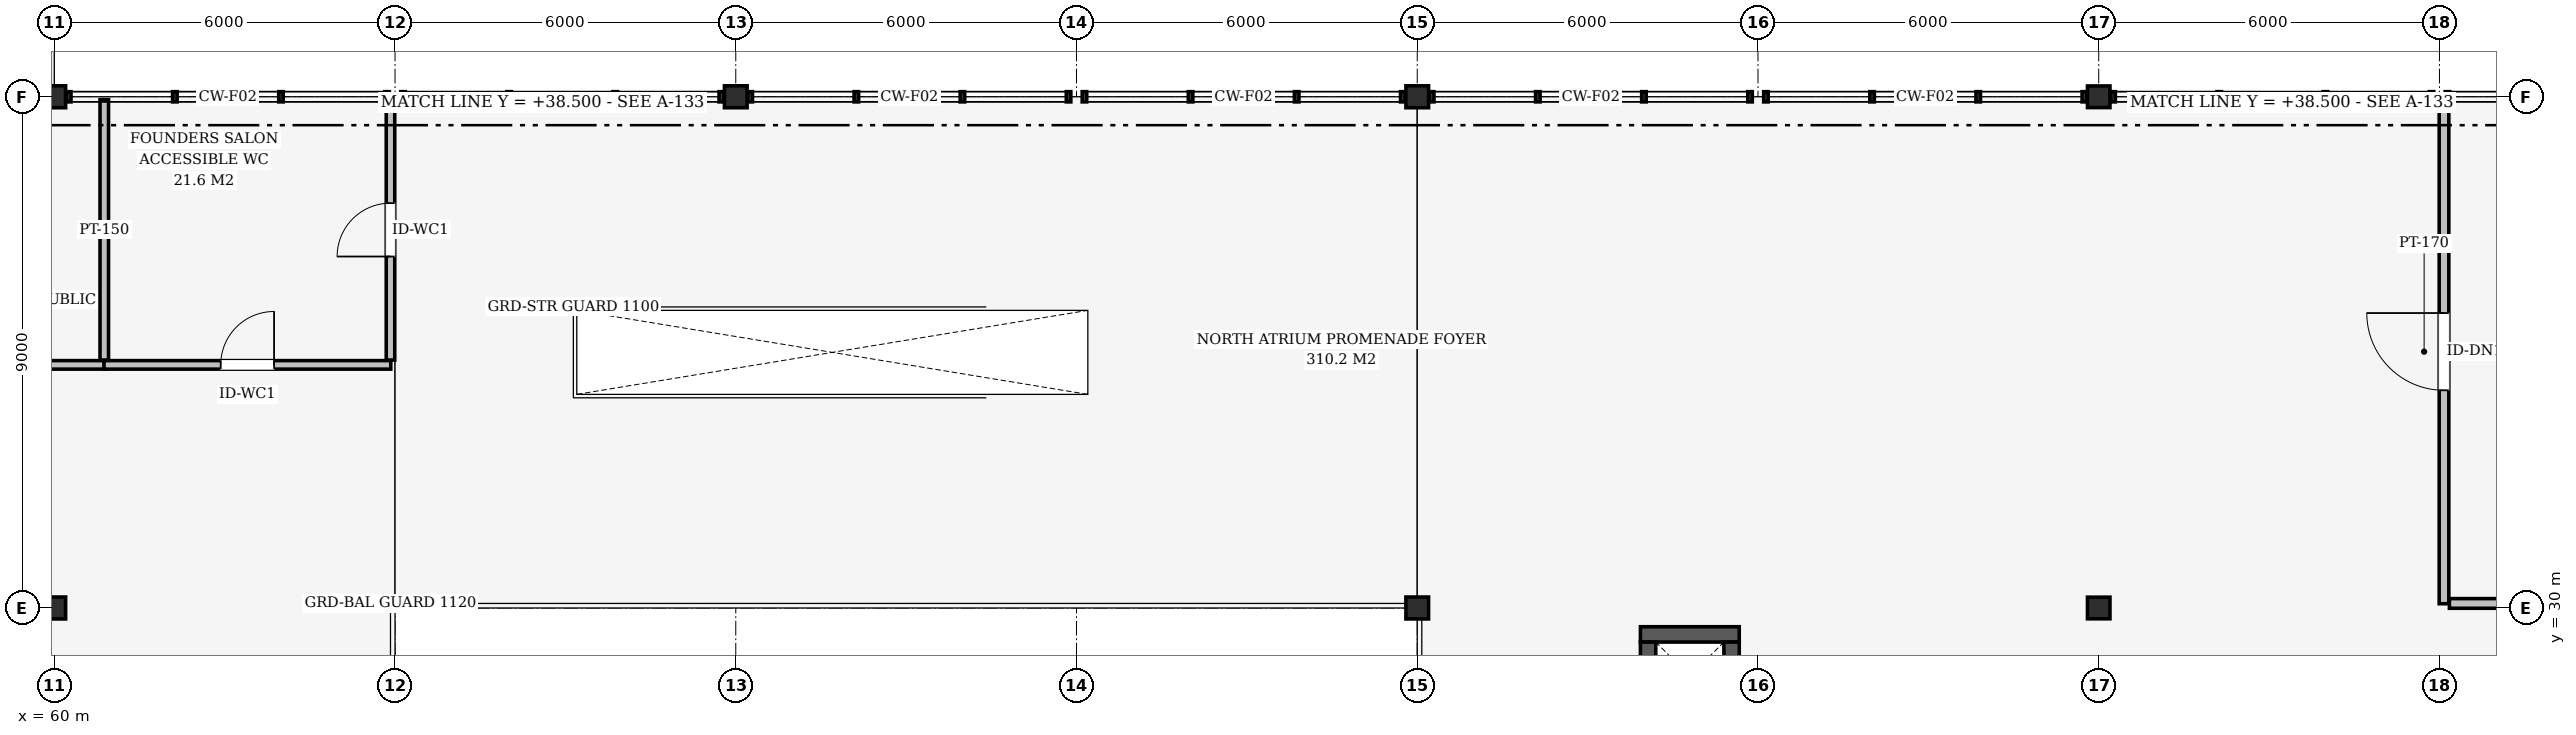
"""IFC4 building model, lengths in metres.
Left out: names, types, materials, properties, quantities, classifications, styles, units other than length and angle.
Written with IfcOpenShell. Run it as: python <this file> out.ifc"""

import sys

from ifc_helpers import new_model, si_unit, direction, frame, frame_2d, origin, origin_2d, place, context, subcontext, project, spatial, rectangle, i_section, extrude, element, fill, save


model = new_model("IFC4")
c1 = context("Model", 3, precision=1e-05, world=origin(), true_north=direction((0.0, 1.0)))
c2 = subcontext(c1, "Body", "Model", "MODEL_VIEW")
j1 = project(units=[si_unit("LENGTHUNIT", "METRE"), si_unit("PLANEANGLEUNIT", "RADIAN")], contexts=[c1])
p1 = place(None, origin())
s1 = spatial("IfcSite", under=j1, at=p1, CompositionType="ELEMENT")
p2 = place(p1, origin())
s2 = spatial("IfcBuilding", under=s1, at=p2, CompositionType="ELEMENT")
p3 = place(p2, frame((0.0, 0.0, 9.3)))
s3 = spatial("IfcBuildingStorey", under=s2, at=p3, CompositionType="ELEMENT", Elevation=9.3)
for number, where, z_axis, x_axis in (
    (1, (60.0, 30.0, 0.0), (0.0, 0.0, 1.0), (1.0, 0.0, 0.0)),
    (2, (60.0, 39.0, 0.0), (0.0, 0.0, 1.0), (1.0, 0.0, 0.0)),
    (3, (72.0, 39.0, 0.0), (0.0, 0.0, 1.0), (1.0, 0.0, 0.0)),
    (4, (84.0, 30.0, 0.0), (0.0, 0.0, 1.0), (1.0, 0.0, 0.0)),
    (5, (84.0, 39.0, 0.0), (0.0, 0.0, 1.0), (1.0, 0.0, 0.0)),
):
    element("IfcColumn", number, at=place(p3, frame(where, z_axis=z_axis, x_axis=x_axis)), inside=s3, PredefinedType="COLUMN", context=c2, shape_type="SweptSolid", body=[
        extrude(i_section(OverallWidth=0.399, OverallDepth=0.386, WebThickness=0.021, FlangeThickness=0.033, at=origin_2d()), origin(), (0.0, 0.0, 1.0), 4.37),
    ])
for number, where, z_axis, x_axis in (
    (6, (96.0, 30.0, 0.0), (0.0, 0.0, 1.0), (1.0, 0.0, 0.0)),
    (7, (96.0, 39.0, 0.0), (0.0, 0.0, 1.0), (1.0, 0.0, 0.0)),
):
    element("IfcColumn", number, at=place(p3, frame(where, z_axis=z_axis, x_axis=x_axis)), inside=s3, PredefinedType="COLUMN", context=c2, shape_type="SweptSolid", body=[
        extrude(i_section(OverallWidth=0.396, OverallDepth=0.381, WebThickness=0.019, FlangeThickness=0.03, at=origin_2d()), origin(), (0.0, 0.0, 1.0), 4.37),
    ])
p4 = place(p3, frame((87.93, 29.535, 0.0), z_axis=(0.0, 0.0, 1.0), x_axis=(1.0, 0.0, 0.0)))
e8 = element("IfcWall", 8, at=p4, inside=s3, PredefinedType="SHEAR", context=c2, shape_type="SweptSolid", body=[
    extrude(rectangle(XDim=1.74, YDim=0.27, at=frame_2d((0.87, 0.0))), origin(), (0.0, 0.0, 1.0), 4.37),
])
for number, where, z_axis, x_axis in (
    (9, (88.065, 28.2, 0.0), (0.0, 0.0, 1.0), (0.0, 1.0, 0.0)),
    (10, (89.535, 28.2, 0.0), (0.0, 0.0, 1.0), (0.0, 1.0, 0.0)),
):
    element("IfcWall", number, at=place(p3, frame(where, z_axis=z_axis, x_axis=x_axis)), inside=s3, PredefinedType="SHEAR", context=c2, shape_type="SweptSolid", body=[
        extrude(rectangle(XDim=1.2, YDim=0.27, at=frame_2d((0.6, 0.0))), origin(), (0.0, 0.0, 1.0), 4.37),
    ])
p5 = place(p3, frame((48.09, 34.28, 0.0), z_axis=(0.0, 0.0, 1.0), x_axis=(1.0, 0.0, 0.0)))
e11 = element("IfcWall", 11, at=p5, inside=s3, PredefinedType="PARTITIONING", context=c2, shape_type="SweptSolid", body=[
    extrude(rectangle(XDim=12.795, YDim=0.15, at=frame_2d((6.397, 0.0))), origin(), (0.0, 0.0, 1.0), 4.35),
])
p6 = place(p5, frame((5.893, 0.0, 0.0)))
e12 = element("IfcOpeningElement", 12, at=p6, cuts=e11, PredefinedType="OPENING", context=c2, shape_type="SweptSolid", body=[
    extrude(rectangle(XDim=1.01, YDim=2.1, at=frame_2d((0.505, 1.05))), frame((0.0, 0.085, 0.0), z_axis=(0.0, -1.0, 0.0), x_axis=(1.0, 0.0, 0.0)), (0.0, 0.0, 1.0), 0.17),
])
p7 = place(p3, frame((60.875, 34.28, 0.0), z_axis=(0.0, 0.0, 1.0), x_axis=(1.0, 0.0, 0.0)))
e13 = element("IfcWall", 13, at=p7, inside=s3, PredefinedType="PARTITIONING", context=c2, shape_type="SweptSolid", body=[
    extrude(rectangle(XDim=5.05, YDim=0.15, at=frame_2d((2.525, 0.0))), origin(), (0.0, 0.0, 1.0), 4.35),
])
p8 = place(p7, frame((2.055, 0.0, 0.0)))
e14 = element("IfcOpeningElement", 14, at=p8, cuts=e13, PredefinedType="OPENING", context=c2, shape_type="SweptSolid", body=[
    extrude(rectangle(XDim=0.94, YDim=2.1, at=frame_2d((0.47, 1.05))), frame((0.0, 0.085, 0.0), z_axis=(0.0, -1.0, 0.0), x_axis=(1.0, 0.0, 0.0)), (0.0, 0.0, 1.0), 0.17),
])
p9 = place(p3, frame((60.88, 34.365, 0.0), z_axis=(0.0, 0.0, 1.0), x_axis=(0.0, 1.0, 0.0)))
e15 = element("IfcWall", 15, at=p9, inside=s3, PredefinedType="PARTITIONING", context=c2, shape_type="SweptSolid", body=[
    extrude(rectangle(XDim=4.585, YDim=0.15, at=frame_2d((2.292, 0.0))), origin(), (0.0, 0.0, 1.0), 4.35),
])
p10 = place(p3, frame((65.92, 34.365, 0.0), z_axis=(0.0, 0.0, 1.0), x_axis=(0.0, 1.0, 0.0)))
e16 = element("IfcWall", 16, at=p10, inside=s3, PredefinedType="PARTITIONING", context=c2, shape_type="SweptSolid", body=[
    extrude(rectangle(XDim=4.585, YDim=0.15, at=frame_2d((2.292, 0.0))), origin(), (0.0, 0.0, 1.0), 3.936),
])
p11 = place(p10, frame((1.823, 0.0, 0.0)))
e17 = element("IfcOpeningElement", 17, at=p11, cuts=e16, PredefinedType="OPENING", context=c2, shape_type="SweptSolid", body=[
    extrude(rectangle(XDim=0.94, YDim=2.1, at=frame_2d((0.47, 1.05))), frame((0.0, 0.085, 0.0), z_axis=(0.0, -1.0, 0.0), x_axis=(1.0, 0.0, 0.0)), (0.0, 0.0, 1.0), 0.17),
])
p12 = place(p3, frame((102.08, 30.075, 0.0), z_axis=(0.0, 0.0, 1.0), x_axis=(0.0, 1.0, 0.0)))
e18 = element("IfcWall", 18, at=p12, inside=s3, PredefinedType="PARTITIONING", context=c2, shape_type="SweptSolid", body=[
    extrude(rectangle(XDim=8.875, YDim=0.17, at=frame_2d((4.438, 0.0))), origin(), (0.0, 0.0, 1.0), 3.936),
])
p13 = place(p12, frame((3.758, 0.0, 0.0)))
e19 = element("IfcOpeningElement", 19, at=p13, cuts=e18, PredefinedType="OPENING", context=c2, shape_type="SweptSolid", body=[
    extrude(rectangle(XDim=1.36, YDim=2.2, at=frame_2d((0.68, 1.1))), frame((0.0, 0.095, 0.0), z_axis=(0.0, -1.0, 0.0), x_axis=(1.0, 0.0, 0.0)), (0.0, 0.0, 1.0), 0.19),
])
p14 = place(p3, frame((102.175, 30.08, 0.0), z_axis=(0.0, 0.0, 1.0), x_axis=(1.0, 0.0, 0.0)))
e20 = element("IfcWall", 20, at=p14, inside=s3, PredefinedType="PARTITIONING", context=c2, shape_type="SweptSolid", body=[
    extrude(rectangle(XDim=5.619, YDim=0.17, at=frame_2d((2.81, 0.0))), origin(), (0.0, 0.0, 1.0), 3.739),
])
p15 = place(p8, origin())
e21 = element("IfcDoor", 21, at=p15, inside=s3, OperationType="SINGLE_SWING_RIGHT", PredefinedType="DOOR", context=c2, shape_type="SweptSolid", body=[
    extrude(rectangle(XDim=0.94, YDim=2.1, at=frame_2d((0.47, 1.05))), frame((0.0, 0.025, 0.0), z_axis=(0.0, -1.0, 0.0), x_axis=(1.0, 0.0, 0.0)), (0.0, 0.0, 1.0), 0.05),
])
fill(e14, e21)
p16 = place(p11, origin())
e22 = element("IfcDoor", 22, at=p16, inside=s3, OperationType="SINGLE_SWING_LEFT", PredefinedType="DOOR", context=c2, shape_type="SweptSolid", body=[
    extrude(rectangle(XDim=0.94, YDim=2.1, at=frame_2d((0.47, 1.05))), frame((0.0, 0.025, 0.0), z_axis=(0.0, -1.0, 0.0), x_axis=(1.0, 0.0, 0.0)), (0.0, 0.0, 1.0), 0.05),
])
fill(e17, e22)
p17 = place(p13, origin())
e23 = element("IfcDoor", 23, at=p17, inside=s3, OperationType="SINGLE_SWING_RIGHT", PredefinedType="DOOR", context=c2, shape_type="SweptSolid", body=[
    extrude(rectangle(XDim=1.36, YDim=2.2, at=frame_2d((0.68, 1.1))), frame((0.0, 0.025, 0.0), z_axis=(0.0, -1.0, 0.0), x_axis=(1.0, 0.0, 0.0)), (0.0, 0.0, 1.0), 0.05),
])
fill(e19, e23)
save(model, sys.argv[1])
